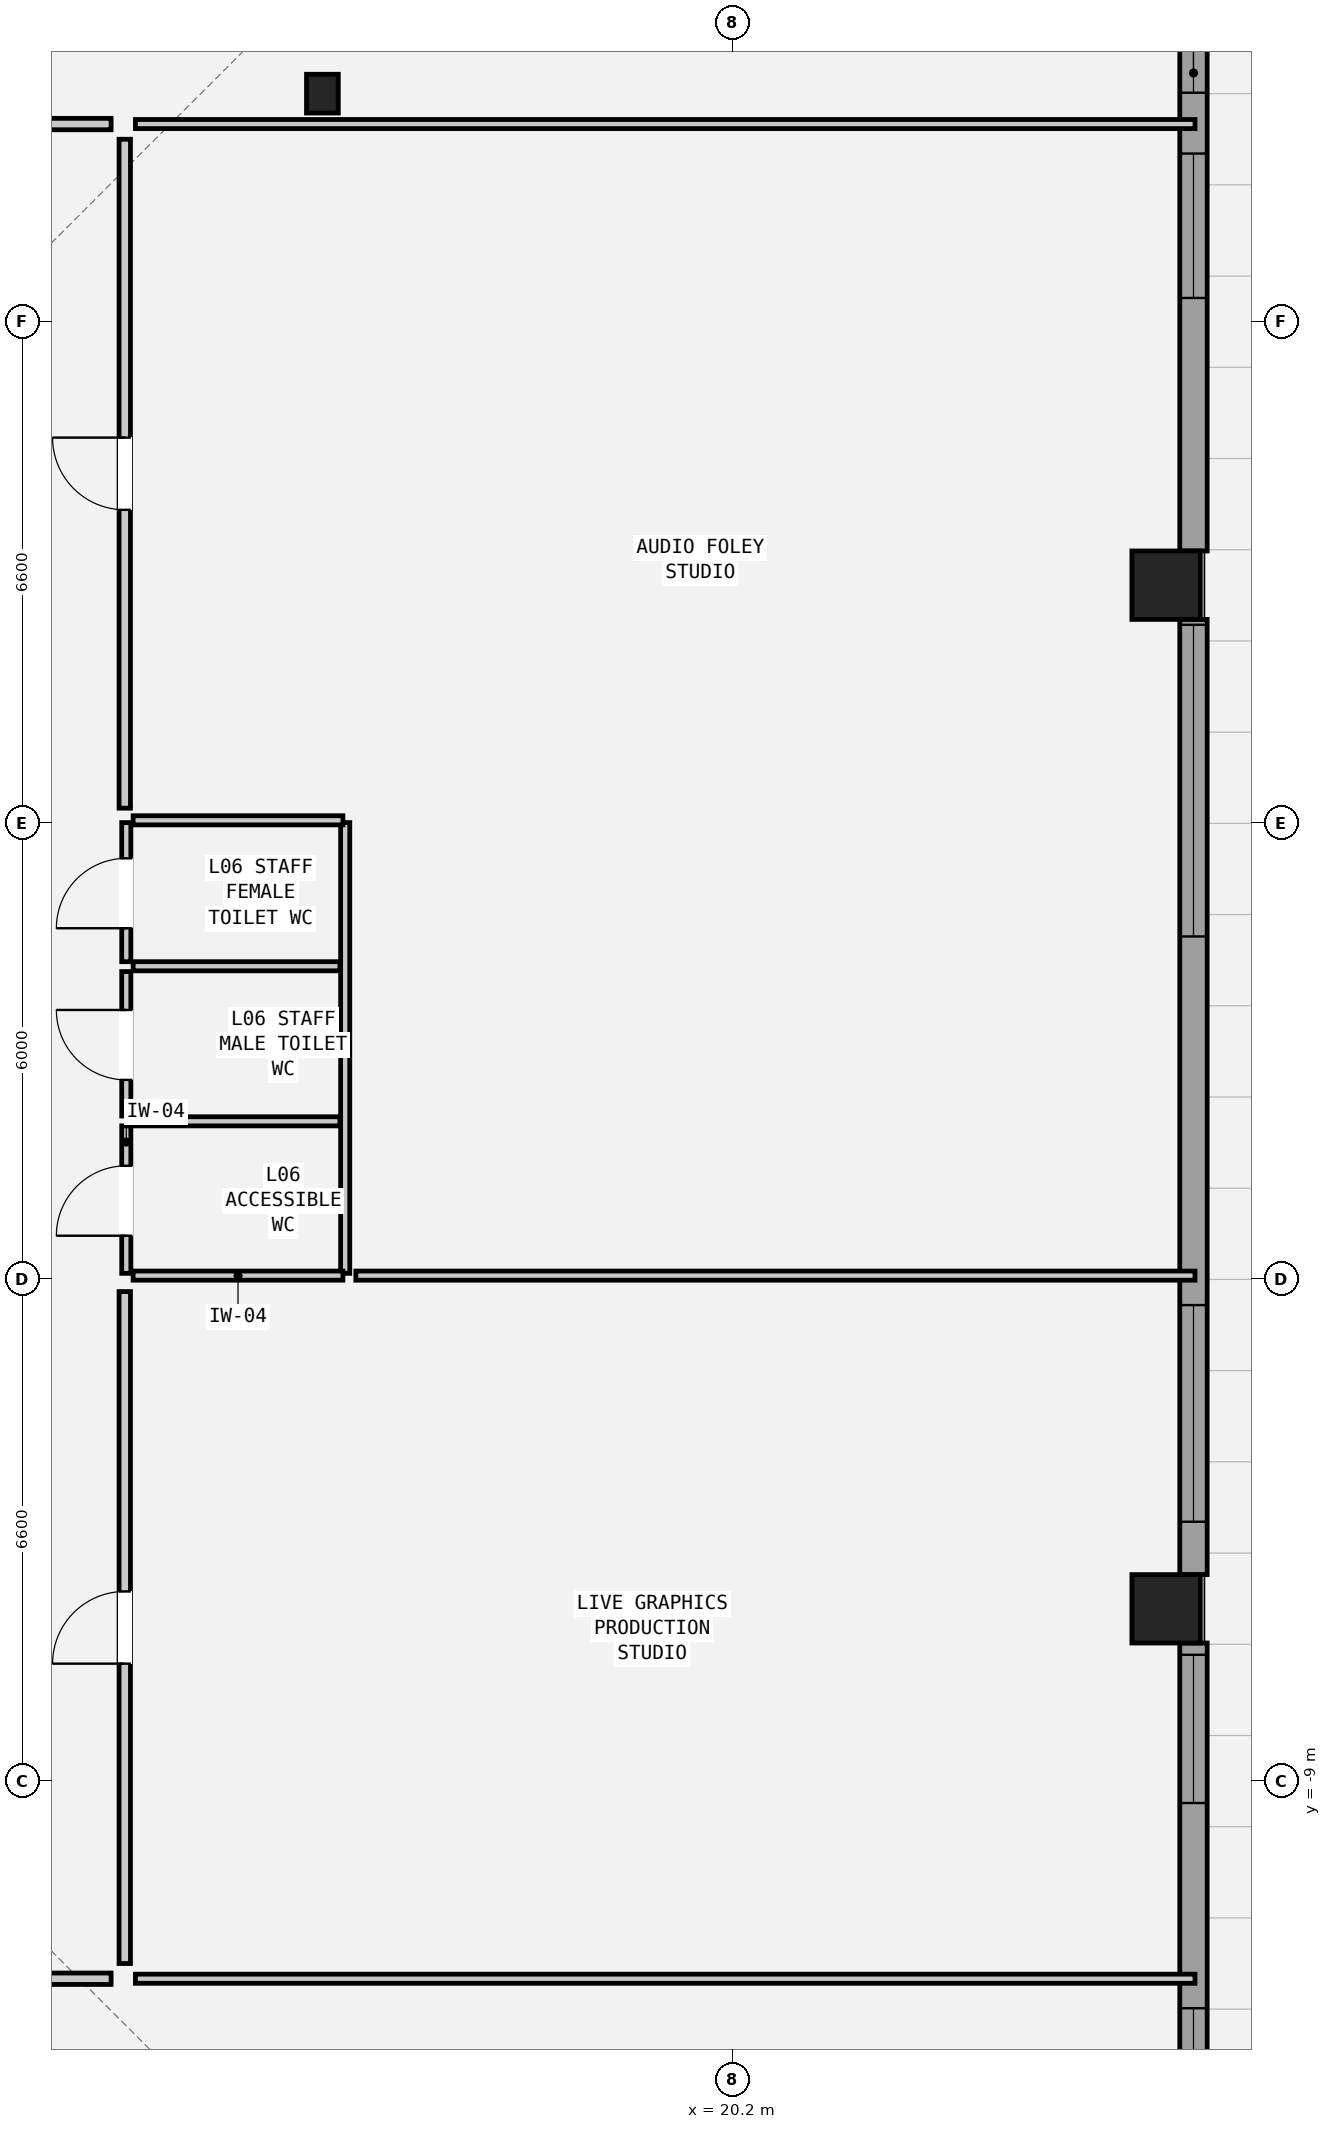
"""IFC4 building model, lengths in metres.
Left out: names, types, materials, properties, quantities, classifications, styles, units other than length and angle.
Written with IfcOpenShell. Run it as: python <this file> out.ifc"""

import sys

from ifc_helpers import new_model, si_unit, direction, frame, frame_2d, origin, origin_2d, place, context, subcontext, project, spatial, rectangle, hollow_rectangle, i_section, extrude, element, fill, save


model = new_model("IFC4")
c1 = context("Model", 3, precision=1e-05, world=origin(), true_north=direction((0.0, 1.0)))
c2 = subcontext(c1, "Body", "Model", "MODEL_VIEW")
j1 = project(units=[si_unit("LENGTHUNIT", "METRE"), si_unit("PLANEANGLEUNIT", "RADIAN")], contexts=[c1])
p1 = place(None, origin())
s1 = spatial("IfcSite", under=j1, at=p1, CompositionType="ELEMENT")
p2 = place(p1, origin())
s2 = spatial("IfcBuilding", under=s1, at=p2, CompositionType="ELEMENT")
p3 = place(p2, frame((0.0, 0.0, 26.1)))
s3 = spatial("IfcBuildingStorey", under=s2, at=p3, CompositionType="ELEMENT", Elevation=26.1)
for number, where, z_axis, x_axis in (
    (1, (25.9, -6.733, 0.0), (0.0, 0.0, 1.0), (0.0, 1.0, 0.0)),
    (2, (25.9, 6.733, 0.0), (0.0, 0.0, 1.0), (0.0, 1.0, 0.0)),
):
    element("IfcColumn", number, at=place(p3, frame(where, z_axis=z_axis, x_axis=x_axis)), inside=s3, PredefinedType="COLUMN", context=c2, shape_type="SweptSolid", body=[
        extrude(hollow_rectangle(XDim=0.9, YDim=0.9, WallThickness=0.055, at=origin_2d()), origin(), (0.0, 0.0, 1.0), 3.05),
    ])
p4 = place(p3, frame((14.8, 13.2, 0.0), z_axis=(0.0, 0.0, 1.0), x_axis=(1.0, 0.0, 0.0)))
e3 = element("IfcColumn", 3, at=p4, inside=s3, PredefinedType="COLUMN", context=c2, shape_type="SweptSolid", body=[
    extrude(i_section(OverallWidth=0.418, OverallDepth=0.51, WebThickness=0.042, FlangeThickness=0.068, at=origin_2d()), origin(), (0.0, 0.0, 1.0), 3.05),
])
p5 = place(p3, frame((26.26, 19.762, 0.0), z_axis=(0.0, 0.0, 1.0), x_axis=(0.0, -1.0, 0.0)))
e4 = element("IfcWall", 4, at=p5, inside=s3, PredefinedType="SOLIDWALL", context=c2, shape_type="SweptSolid", body=[
    extrude(rectangle(XDim=12.579, YDim=0.36, at=frame_2d((6.289, 0.0))), origin(), (0.0, 0.0, 1.0), 2.067),
])
p6 = place(p5, frame((2.15, 0.0, 1.2)))
e5 = element("IfcOpeningElement", 5, at=p6, cuts=e4, PredefinedType="OPENING", context=c2, shape_type="SweptSolid", body=[
    extrude(rectangle(XDim=1.95, YDim=0.7, at=frame_2d((0.975, 0.35))), frame((0.0, 0.192, 0.0), z_axis=(0.0, -1.0, 0.0), x_axis=(1.0, 0.0, 0.0)), (0.0, 0.0, 1.0), 0.384),
])
p7 = place(p5, frame((5.05, 0.0, 0.2)))
e6 = element("IfcOpeningElement", 6, at=p7, cuts=e4, PredefinedType="OPENING", context=c2, shape_type="SweptSolid", body=[
    extrude(rectangle(XDim=1.5, YDim=0.95, at=frame_2d((0.75, 0.475))), frame((0.0, 0.192, 0.0), z_axis=(0.0, -1.0, 0.0), x_axis=(1.0, 0.0, 0.0)), (0.0, 0.0, 1.0), 0.384),
])
p8 = place(p5, frame((7.35, 0.0, 0.2)))
e7 = element("IfcOpeningElement", 7, at=p8, cuts=e4, PredefinedType="OPENING", context=c2, shape_type="SweptSolid", body=[
    extrude(rectangle(XDim=1.9, YDim=1.1, at=frame_2d((0.95, 0.55))), frame((0.0, 0.192, 0.0), z_axis=(0.0, -1.0, 0.0), x_axis=(1.0, 0.0, 0.0)), (0.0, 0.0, 1.0), 0.384),
])
p9 = place(p3, frame((26.26, 6.283, 0.0), z_axis=(0.0, 0.0, 1.0), x_axis=(0.0, -1.0, 0.0)))
e8 = element("IfcWall", 8, at=p9, inside=s3, PredefinedType="SOLIDWALL", context=c2, shape_type="SweptSolid", body=[
    extrude(rectangle(XDim=12.566, YDim=0.36, at=frame_2d((6.283, 0.0))), origin(), (0.0, 0.0, 1.0), 2.067),
])
p10 = place(p9, frame((0.071, 0.0, 0.2)))
e9 = element("IfcOpeningElement", 9, at=p10, cuts=e8, PredefinedType="OPENING", context=c2, shape_type="SweptSolid", body=[
    extrude(rectangle(XDim=4.1, YDim=1.05, at=frame_2d((2.05, 0.525))), frame((0.0, 0.192, 0.0), z_axis=(0.0, -1.0, 0.0), x_axis=(1.0, 0.0, 0.0)), (0.0, 0.0, 1.0), 0.384),
])
p11 = place(p9, frame((9.021, 0.0, 0.2)))
e10 = element("IfcOpeningElement", 10, at=p11, cuts=e8, PredefinedType="OPENING", context=c2, shape_type="SweptSolid", body=[
    extrude(rectangle(XDim=2.85, YDim=1.4, at=frame_2d((1.425, 0.7))), frame((0.0, 0.192, 0.0), z_axis=(0.0, -1.0, 0.0), x_axis=(1.0, 0.0, 0.0)), (0.0, 0.0, 1.0), 0.384),
])
p12 = place(p3, frame((26.26, -7.183, 0.0), z_axis=(0.0, 0.0, 1.0), x_axis=(0.0, -1.0, 0.0)))
e11 = element("IfcWall", 11, at=p12, inside=s3, PredefinedType="SOLIDWALL", context=c2, shape_type="SweptSolid", body=[
    extrude(rectangle(XDim=12.579, YDim=0.36, at=frame_2d((6.289, 0.0))), origin(), (0.0, 0.0, 1.0), 2.067),
])
p13 = place(p12, frame((0.155, 0.0, 1.2)))
e12 = element("IfcOpeningElement", 12, at=p13, cuts=e11, PredefinedType="OPENING", context=c2, shape_type="SweptSolid", body=[
    extrude(rectangle(XDim=1.95, YDim=0.7, at=frame_2d((0.975, 0.35))), frame((0.0, 0.192, 0.0), z_axis=(0.0, -1.0, 0.0), x_axis=(1.0, 0.0, 0.0)), (0.0, 0.0, 1.0), 0.384),
])
p14 = place(p12, frame((4.805, 0.0, 0.2)))
e13 = element("IfcOpeningElement", 13, at=p14, cuts=e11, PredefinedType="OPENING", context=c2, shape_type="SweptSolid", body=[
    extrude(rectangle(XDim=2.1, YDim=1.3, at=frame_2d((1.05, 0.65))), frame((0.0, 0.192, 0.0), z_axis=(0.0, -1.0, 0.0), x_axis=(1.0, 0.0, 0.0)), (0.0, 0.0, 1.0), 0.384),
])
p15 = place(p3, frame((12.22, -2.32, 0.0), z_axis=(0.0, 0.0, 1.0), x_axis=(0.0, 1.0, 0.0)))
e14 = element("IfcWall", 14, at=p15, inside=s3, PredefinedType="PARTITIONING", context=c2, shape_type="SweptSolid", body=[
    extrude(rectangle(XDim=1.94, YDim=0.12, at=frame_2d((0.97, 0.0))), origin(), (0.0, 0.0, 1.0), 2.83),
])
p16 = place(p15, frame((0.495, 0.0, 0.0)))
e15 = element("IfcOpeningElement", 15, at=p16, cuts=e14, PredefinedType="OPENING", context=c2, shape_type="SweptSolid", body=[
    extrude(rectangle(XDim=0.92, YDim=2.1, at=frame_2d((0.46, 1.05))), frame((0.0, 0.072, 0.0), z_axis=(0.0, -1.0, 0.0), x_axis=(1.0, 0.0, 0.0)), (0.0, 0.0, 1.0), 0.144),
])
p17 = place(p3, frame((12.22, -0.25, 0.0), z_axis=(0.0, 0.0, 1.0), x_axis=(0.0, 1.0, 0.0)))
e16 = element("IfcWall", 16, at=p17, inside=s3, PredefinedType="PARTITIONING", context=c2, shape_type="SweptSolid", body=[
    extrude(rectangle(XDim=1.9, YDim=0.12, at=frame_2d((0.95, 0.0))), origin(), (0.0, 0.0, 1.0), 2.83),
])
p18 = place(p17, frame((0.475, 0.0, 0.0)))
e17 = element("IfcOpeningElement", 17, at=p18, cuts=e16, PredefinedType="OPENING", context=c2, shape_type="SweptSolid", body=[
    extrude(rectangle(XDim=0.92, YDim=2.1, at=frame_2d((0.46, 1.05))), frame((0.0, 0.072, 0.0), z_axis=(0.0, -1.0, 0.0), x_axis=(1.0, 0.0, 0.0)), (0.0, 0.0, 1.0), 0.144),
])
p19 = place(p3, frame((12.22, 1.78, 0.0), z_axis=(0.0, 0.0, 1.0), x_axis=(0.0, 1.0, 0.0)))
e18 = element("IfcWall", 18, at=p19, inside=s3, PredefinedType="PARTITIONING", context=c2, shape_type="SweptSolid", body=[
    extrude(rectangle(XDim=1.83, YDim=0.12, at=frame_2d((0.915, 0.0))), origin(), (0.0, 0.0, 1.0), 2.83),
])
p20 = place(p19, frame((0.44, 0.0, 0.0)))
e19 = element("IfcOpeningElement", 19, at=p20, cuts=e18, PredefinedType="OPENING", context=c2, shape_type="SweptSolid", body=[
    extrude(rectangle(XDim=0.92, YDim=2.1, at=frame_2d((0.46, 1.05))), frame((0.0, 0.072, 0.0), z_axis=(0.0, -1.0, 0.0), x_axis=(1.0, 0.0, 0.0)), (0.0, 0.0, 1.0), 0.144),
])
p21 = place(p3, frame((15.1, -2.32, 0.0), z_axis=(0.0, 0.0, 1.0), x_axis=(0.0, 1.0, 0.0)))
e20 = element("IfcWall", 20, at=p21, inside=s3, PredefinedType="PARTITIONING", context=c2, shape_type="SweptSolid", body=[
    extrude(rectangle(XDim=5.93, YDim=0.12, at=frame_2d((2.965, 0.0))), origin(), (0.0, 0.0, 1.0), 2.83),
])
for number, where, z_axis, x_axis in (
    (21, (12.31, -2.35, 0.0), (0.0, 0.0, 1.0), (1.0, 0.0, 0.0)),
    (22, (12.31, 3.64, 0.0), (0.0, 0.0, 1.0), (1.0, 0.0, 0.0)),
):
    element("IfcWall", number, at=place(p3, frame(where, z_axis=z_axis, x_axis=x_axis)), inside=s3, PredefinedType="PARTITIONING", context=c2, shape_type="SweptSolid", body=[
        extrude(rectangle(XDim=2.76, YDim=0.12, at=frame_2d((1.38, 0.0))), origin(), (0.0, 0.0, 1.0), 1.799),
    ])
for number, where, z_axis, x_axis in (
    (23, (12.31, -0.32, 0.0), (0.0, 0.0, 1.0), (1.0, 0.0, 0.0)),
    (24, (12.31, 1.72, 0.0), (0.0, 0.0, 1.0), (1.0, 0.0, 0.0)),
):
    element("IfcWall", number, at=place(p3, frame(where, z_axis=z_axis, x_axis=x_axis)), inside=s3, PredefinedType="PARTITIONING", context=c2, shape_type="SweptSolid", body=[
        extrude(rectangle(XDim=2.72, YDim=0.12, at=frame_2d((1.36, 0.0))), origin(), (0.0, 0.0, 1.0), 2.83),
    ])
p22 = place(p3, frame((12.34, 12.8, 0.0), z_axis=(0.0, 0.0, 1.0), x_axis=(1.0, 0.0, 0.0)))
e25 = element("IfcWall", 25, at=p22, inside=s3, PredefinedType="PARTITIONING", context=c2, shape_type="SweptSolid", body=[
    extrude(rectangle(XDim=13.94, YDim=0.12, at=frame_2d((6.97, 0.0))), origin(), (0.0, 0.0, 1.0), 2.83),
])
p23 = place(p3, frame((12.34, -11.6, 0.0), z_axis=(0.0, 0.0, 1.0), x_axis=(1.0, 0.0, 0.0)))
e26 = element("IfcWall", 26, at=p23, inside=s3, PredefinedType="PARTITIONING", context=c2, shape_type="SweptSolid", body=[
    extrude(rectangle(XDim=13.94, YDim=0.12, at=frame_2d((6.97, 0.0))), origin(), (0.0, 0.0, 1.0), 2.274),
])
p24 = place(p3, frame((15.24, -2.35, 0.0), z_axis=(0.0, 0.0, 1.0), x_axis=(1.0, 0.0, 0.0)))
e27 = element("IfcWall", 27, at=p24, inside=s3, PredefinedType="PARTITIONING", context=c2, shape_type="SweptSolid", body=[
    extrude(rectangle(XDim=11.04, YDim=0.12, at=frame_2d((5.52, 0.0))), origin(), (0.0, 0.0, 1.0), 1.799),
])
p25 = place(p3, frame((-3.32, 12.8, 0.0), z_axis=(0.0, 0.0, 1.0), x_axis=(1.0, 0.0, 0.0)))
e28 = element("IfcWall", 28, at=p25, inside=s3, PredefinedType="PARTITIONING", context=c2, shape_type="SweptSolid", body=[
    extrude(rectangle(XDim=15.34, YDim=0.15, at=frame_2d((7.67, 0.0))), origin(), (0.0, 0.0, 1.0), 2.83),
])
p26 = place(p25, frame((7.195, 0.0, 0.0)))
e29 = element("IfcOpeningElement", 29, at=p26, cuts=e28, PredefinedType="OPENING", context=c2, shape_type="SweptSolid", body=[
    extrude(rectangle(XDim=0.95, YDim=2.1, at=frame_2d((0.475, 1.05))), frame((0.0, 0.087, 0.0), z_axis=(0.0, -1.0, 0.0), x_axis=(1.0, 0.0, 0.0)), (0.0, 0.0, 1.0), 0.174),
])
p27 = place(p3, frame((-12.02, -11.6, 0.0), z_axis=(0.0, 0.0, 1.0), x_axis=(1.0, 0.0, 0.0)))
e30 = element("IfcWall", 30, at=p27, inside=s3, PredefinedType="PARTITIONING", context=c2, shape_type="SweptSolid", body=[
    extrude(rectangle(XDim=24.04, YDim=0.15, at=frame_2d((12.02, 0.0))), origin(), (0.0, 0.0, 1.0), 2.274),
])
p28 = place(p27, frame((11.545, 0.0, 0.0)))
e31 = element("IfcOpeningElement", 31, at=p28, cuts=e30, PredefinedType="OPENING", context=c2, shape_type="SweptSolid", body=[
    extrude(rectangle(XDim=0.95, YDim=2.1, at=frame_2d((0.475, 1.05))), frame((0.0, 0.087, 0.0), z_axis=(0.0, -1.0, 0.0), x_axis=(1.0, 0.0, 0.0)), (0.0, 0.0, 1.0), 0.174),
])
p29 = place(p3, frame((12.2, -11.4, 0.0), z_axis=(0.0, 0.0, 1.0), x_axis=(0.0, 1.0, 0.0)))
e32 = element("IfcWall", 32, at=p29, inside=s3, PredefinedType="PARTITIONING", context=c2, shape_type="SweptSolid", body=[
    extrude(rectangle(XDim=8.84, YDim=0.15, at=frame_2d((4.42, 0.0))), origin(), (0.0, 0.0, 1.0), 2.83),
])
p30 = place(p29, frame((3.945, 0.0, 0.0)))
e33 = element("IfcOpeningElement", 33, at=p30, cuts=e32, PredefinedType="OPENING", context=c2, shape_type="SweptSolid", body=[
    extrude(rectangle(XDim=0.95, YDim=2.1, at=frame_2d((0.475, 1.05))), frame((0.0, 0.087, 0.0), z_axis=(0.0, -1.0, 0.0), x_axis=(1.0, 0.0, 0.0)), (0.0, 0.0, 1.0), 0.174),
])
p31 = place(p3, frame((12.2, 3.8, 0.0), z_axis=(0.0, 0.0, 1.0), x_axis=(0.0, 1.0, 0.0)))
e34 = element("IfcWall", 34, at=p31, inside=s3, PredefinedType="PARTITIONING", context=c2, shape_type="SweptSolid", body=[
    extrude(rectangle(XDim=8.8, YDim=0.15, at=frame_2d((4.4, 0.0))), origin(), (0.0, 0.0, 1.0), 2.83),
])
p32 = place(p31, frame((3.925, 0.0, 0.0)))
e35 = element("IfcOpeningElement", 35, at=p32, cuts=e34, PredefinedType="OPENING", context=c2, shape_type="SweptSolid", body=[
    extrude(rectangle(XDim=0.95, YDim=2.1, at=frame_2d((0.475, 1.05))), frame((0.0, 0.087, 0.0), z_axis=(0.0, -1.0, 0.0), x_axis=(1.0, 0.0, 0.0)), (0.0, 0.0, 1.0), 0.174),
])
p33 = place(p7, origin())
e36 = element("IfcWindow", 36, at=p33, inside=s3, PartitioningType="SINGLE_PANEL", PredefinedType="WINDOW", context=c2, shape_type="SweptSolid", body=[
    extrude(rectangle(XDim=1.5, YDim=0.95, at=frame_2d((0.75, 0.475))), frame((0.0, 0.03, 0.0), z_axis=(0.0, -1.0, 0.0), x_axis=(1.0, 0.0, 0.0)), (0.0, 0.0, 1.0), 0.06),
])
fill(e6, e36)
p34 = place(p8, origin())
e37 = element("IfcWindow", 37, at=p34, inside=s3, PartitioningType="SINGLE_PANEL", PredefinedType="WINDOW", context=c2, shape_type="SweptSolid", body=[
    extrude(rectangle(XDim=1.9, YDim=1.1, at=frame_2d((0.95, 0.55))), frame((0.0, 0.03, 0.0), z_axis=(0.0, -1.0, 0.0), x_axis=(1.0, 0.0, 0.0)), (0.0, 0.0, 1.0), 0.06),
])
fill(e7, e37)
p35 = place(p10, origin())
e38 = element("IfcWindow", 38, at=p35, inside=s3, PartitioningType="SINGLE_PANEL", PredefinedType="WINDOW", context=c2, shape_type="SweptSolid", body=[
    extrude(rectangle(XDim=4.1, YDim=1.05, at=frame_2d((2.05, 0.525))), frame((0.0, 0.03, 0.0), z_axis=(0.0, -1.0, 0.0), x_axis=(1.0, 0.0, 0.0)), (0.0, 0.0, 1.0), 0.06),
])
fill(e9, e38)
p36 = place(p11, origin())
e39 = element("IfcWindow", 39, at=p36, inside=s3, PartitioningType="SINGLE_PANEL", PredefinedType="WINDOW", context=c2, shape_type="SweptSolid", body=[
    extrude(rectangle(XDim=2.85, YDim=1.4, at=frame_2d((1.425, 0.7))), frame((0.0, 0.03, 0.0), z_axis=(0.0, -1.0, 0.0), x_axis=(1.0, 0.0, 0.0)), (0.0, 0.0, 1.0), 0.06),
])
fill(e10, e39)
p37 = place(p13, origin())
e40 = element("IfcWindow", 40, at=p37, inside=s3, PartitioningType="SINGLE_PANEL", PredefinedType="WINDOW", context=c2, shape_type="SweptSolid", body=[
    extrude(rectangle(XDim=1.95, YDim=0.7, at=frame_2d((0.975, 0.35))), frame((0.0, 0.03, 0.0), z_axis=(0.0, -1.0, 0.0), x_axis=(1.0, 0.0, 0.0)), (0.0, 0.0, 1.0), 0.06),
])
fill(e12, e40)
p38 = place(p14, origin())
e41 = element("IfcWindow", 41, at=p38, inside=s3, PartitioningType="SINGLE_PANEL", PredefinedType="WINDOW", context=c2, shape_type="SweptSolid", body=[
    extrude(rectangle(XDim=2.1, YDim=1.3, at=frame_2d((1.05, 0.65))), frame((0.0, 0.03, 0.0), z_axis=(0.0, -1.0, 0.0), x_axis=(1.0, 0.0, 0.0)), (0.0, 0.0, 1.0), 0.06),
])
fill(e13, e41)
p39 = place(p16, origin())
e42 = element("IfcDoor", 42, at=p39, inside=s3, OperationType="SINGLE_SWING_LEFT", PredefinedType="DOOR", context=c2, shape_type="SweptSolid", body=[
    extrude(rectangle(XDim=0.92, YDim=2.1, at=frame_2d((0.46, 1.05))), frame((0.0, 0.025, 0.0), z_axis=(0.0, -1.0, 0.0), x_axis=(1.0, 0.0, 0.0)), (0.0, 0.0, 1.0), 0.05),
])
fill(e15, e42)
p40 = place(p18, origin())
e43 = element("IfcDoor", 43, at=p40, inside=s3, OperationType="SINGLE_SWING_RIGHT", PredefinedType="DOOR", context=c2, shape_type="SweptSolid", body=[
    extrude(rectangle(XDim=0.92, YDim=2.1, at=frame_2d((0.46, 1.05))), frame((0.0, 0.025, 0.0), z_axis=(0.0, -1.0, 0.0), x_axis=(1.0, 0.0, 0.0)), (0.0, 0.0, 1.0), 0.05),
])
fill(e17, e43)
p41 = place(p20, origin())
e44 = element("IfcDoor", 44, at=p41, inside=s3, OperationType="SINGLE_SWING_LEFT", PredefinedType="DOOR", context=c2, shape_type="SweptSolid", body=[
    extrude(rectangle(XDim=0.92, YDim=2.1, at=frame_2d((0.46, 1.05))), frame((0.0, 0.025, 0.0), z_axis=(0.0, -1.0, 0.0), x_axis=(1.0, 0.0, 0.0)), (0.0, 0.0, 1.0), 0.05),
])
fill(e19, e44)
p42 = place(p30, origin())
e45 = element("IfcDoor", 45, at=p42, inside=s3, OperationType="SINGLE_SWING_LEFT", PredefinedType="DOOR", context=c2, shape_type="SweptSolid", body=[
    extrude(rectangle(XDim=0.95, YDim=2.1, at=frame_2d((0.475, 1.05))), frame((0.0, 0.025, 0.0), z_axis=(0.0, -1.0, 0.0), x_axis=(1.0, 0.0, 0.0)), (0.0, 0.0, 1.0), 0.05),
])
fill(e33, e45)
p43 = place(p32, origin())
e46 = element("IfcDoor", 46, at=p43, inside=s3, OperationType="SINGLE_SWING_RIGHT", PredefinedType="DOOR", context=c2, shape_type="SweptSolid", body=[
    extrude(rectangle(XDim=0.95, YDim=2.1, at=frame_2d((0.475, 1.05))), frame((0.0, 0.025, 0.0), z_axis=(0.0, -1.0, 0.0), x_axis=(1.0, 0.0, 0.0)), (0.0, 0.0, 1.0), 0.05),
])
fill(e35, e46)
save(model, sys.argv[1])
